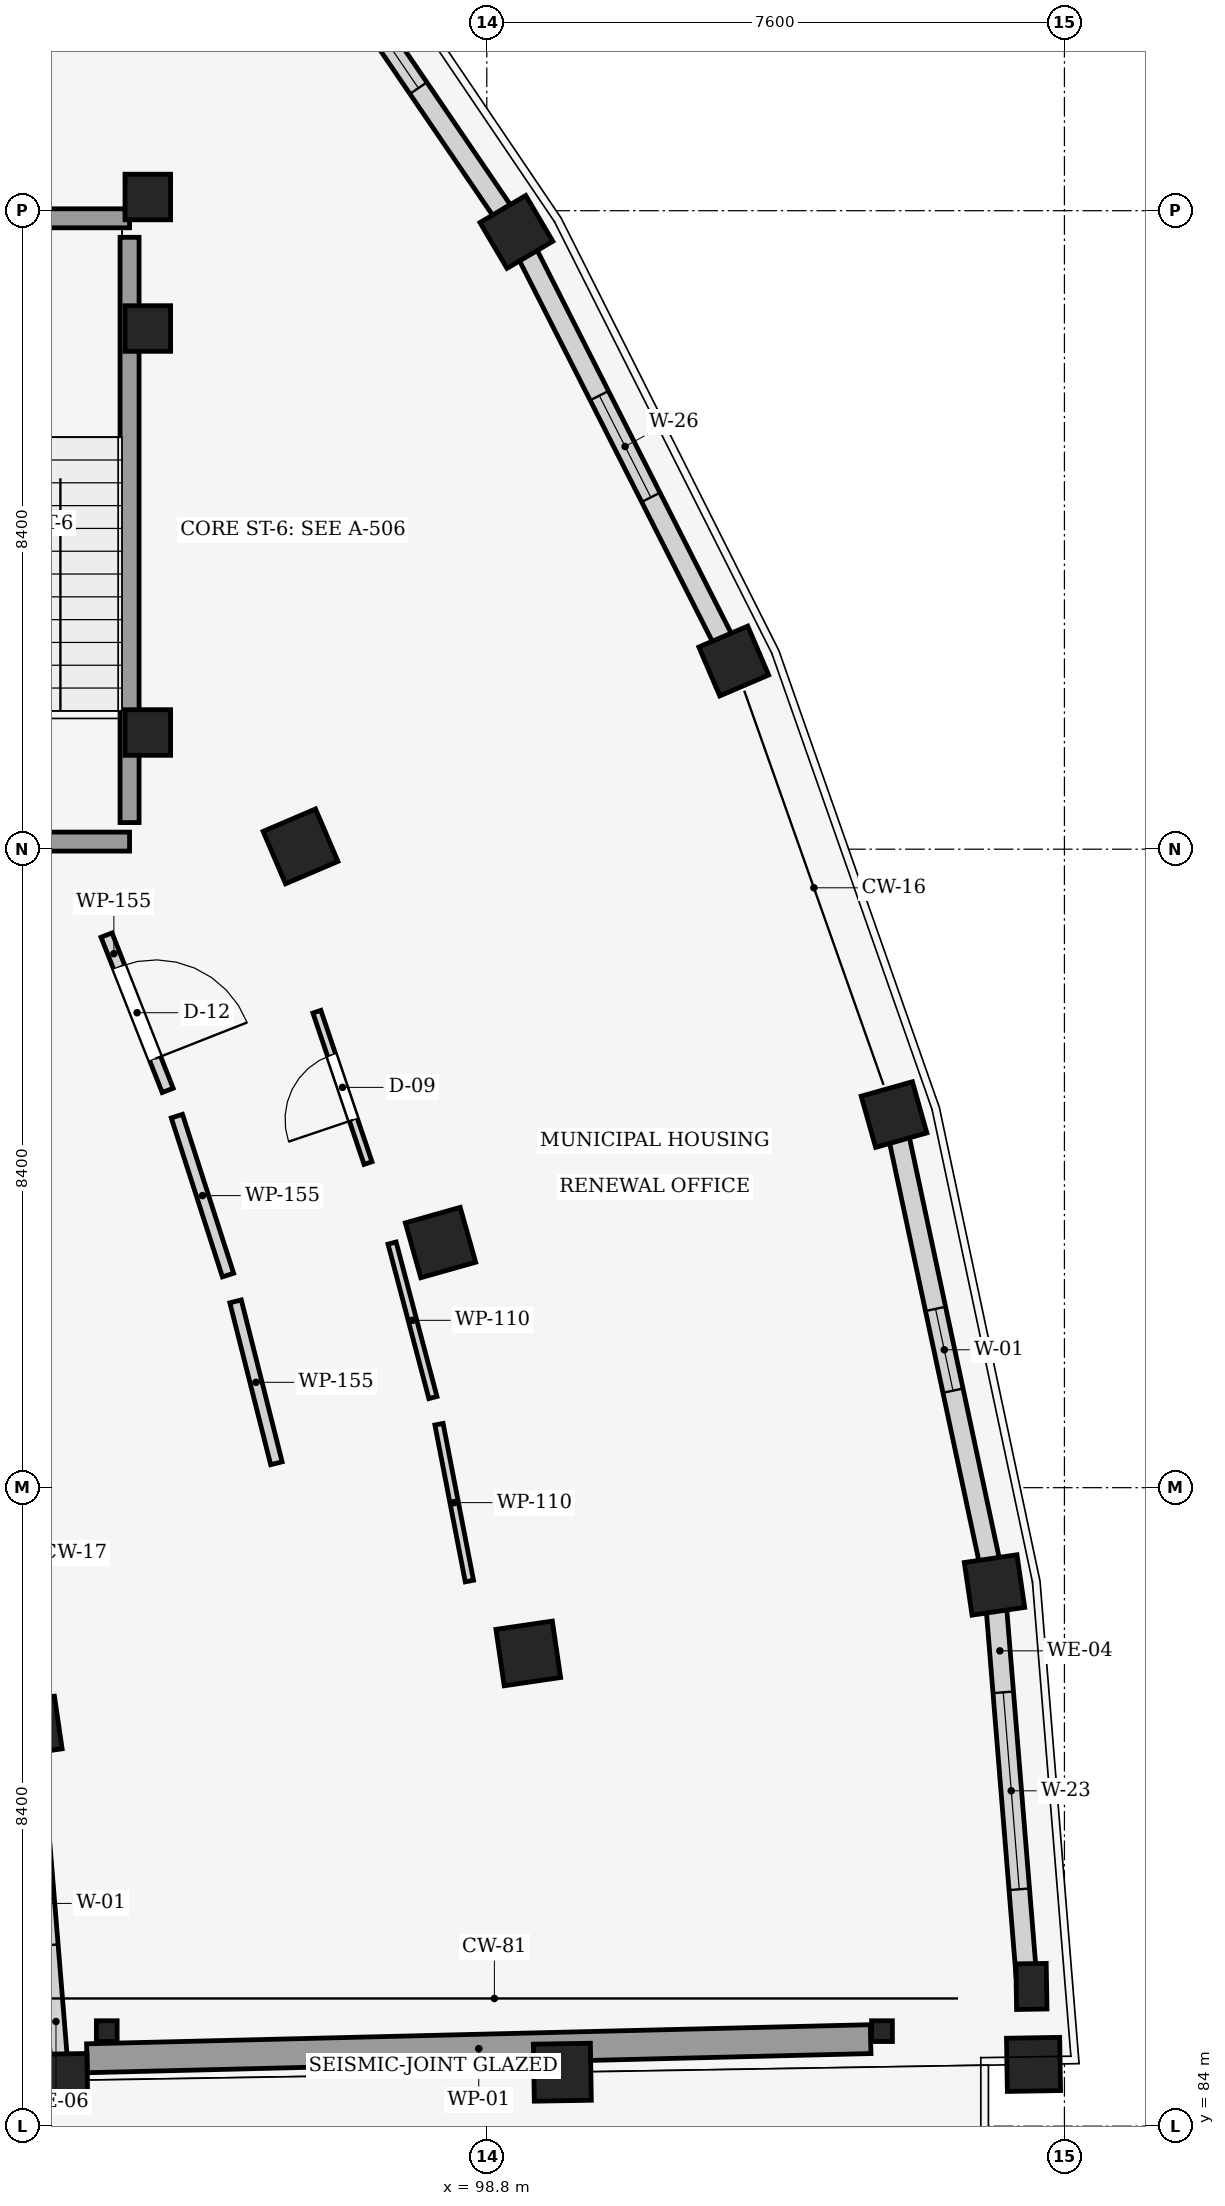
"""IFC4 building model, lengths in metres.
Left out: names, types, materials, properties, quantities, classifications, styles, units other than length and angle.
Written with IfcOpenShell. Run it as: python <this file> out.ifc"""

import sys

from ifc_helpers import new_model, si_unit, direction, frame, frame_2d, origin, origin_2d, place, context, subcontext, project, spatial, rectangle, circle, hollow_circle, extrude, element, fill, save


model = new_model("IFC4")
c1 = context("Model", 3, precision=1e-05, world=origin(), true_north=direction((0.0, 1.0)))
c2 = subcontext(c1, "Body", "Model", "MODEL_VIEW")
j1 = project(units=[si_unit("LENGTHUNIT", "METRE"), si_unit("PLANEANGLEUNIT", "RADIAN")], contexts=[c1])
p1 = place(None, origin())
s1 = spatial("IfcSite", under=j1, at=p1, CompositionType="ELEMENT")
p2 = place(p1, origin())
s2 = spatial("IfcBuilding", under=s1, at=p2, CompositionType="ELEMENT")
p3 = place(p2, frame((0.0, 0.0, 5.1)))
s3 = spatial("IfcBuildingStorey", under=s2, at=p3, CompositionType="ELEMENT", Elevation=5.1)
p4 = place(p3, frame((93.195, 84.6, 0.0), z_axis=(0.0, 0.0, 1.0), x_axis=(0.999862544538, 0.016579868188, 0.0)))
e1 = element("IfcColumn", 1, at=p4, inside=s3, PredefinedType="COLUMN", context=c2, shape_type="SweptSolid", body=[
    extrude(rectangle(XDim=0.7, YDim=0.7, at=origin_2d()), origin(), (0.0, 0.0, 1.0), 4.05),
])
p5 = place(p3, frame((99.794, 84.71, 0.0), z_axis=(0.0, 0.0, 1.0), x_axis=(0.999862544538, 0.016579868188, 0.0)))
e2 = element("IfcColumn", 2, at=p5, inside=s3, PredefinedType="COLUMN", context=c2, shape_type="SweptSolid", body=[
    extrude(circle(Radius=0.375, at=origin_2d()), origin(), (0.0, 0.0, 1.0), 4.05),
])
p6 = place(p3, frame((105.993, 84.812, 0.0), z_axis=(0.0, 0.0, 1.0), x_axis=(0.999862544538, 0.016579868188, 0.0)))
e3 = element("IfcColumn", 3, at=p6, inside=s3, PredefinedType="COLUMN", context=c2, shape_type="SweptSolid", body=[
    extrude(rectangle(XDim=0.7, YDim=0.7, at=origin_2d()), origin(), (0.0, 0.0, 1.0), 4.05),
])
p7 = place(p3, frame((105.966, 85.838, 0.0), z_axis=(0.0, 0.0, 1.0), x_axis=(0.999862544538, 0.016579868188, 0.0)))
e4 = element("IfcColumn", 4, at=p7, inside=s3, PredefinedType="PILASTER", context=c2, shape_type="SweptSolid", body=[
    extrude(rectangle(XDim=0.4, YDim=0.6, at=origin_2d()), origin(), (0.0, 0.0, 1.0), 4.05),
])
p8 = place(p3, frame((92.816, 89.26, 0.0), z_axis=(0.0, 0.0, 1.0), x_axis=(0.989399437751, 0.145219670077, 0.0)))
e5 = element("IfcColumn", 5, at=p8, inside=s3, PredefinedType="COLUMN", context=c2, shape_type="SweptSolid", body=[
    extrude(rectangle(XDim=0.7, YDim=0.7, at=origin_2d()), origin(), (0.0, 0.0, 1.0), 4.05),
])
p9 = place(p3, frame((99.346, 90.219, 0.0), z_axis=(0.0, 0.0, 1.0), x_axis=(0.989399437751, 0.145219670077, 0.0)))
e6 = element("IfcColumn", 6, at=p9, inside=s3, PredefinedType="COLUMN", context=c2, shape_type="SweptSolid", body=[
    extrude(circle(Radius=0.375, at=origin_2d()), origin(), (0.0, 0.0, 1.0), 4.05),
])
p10 = place(p3, frame((105.48, 91.12, 0.0), z_axis=(0.0, 0.0, 1.0), x_axis=(0.989399437751, 0.145219670077, 0.0)))
e7 = element("IfcColumn", 7, at=p10, inside=s3, PredefinedType="COLUMN", context=c2, shape_type="SweptSolid", body=[
    extrude(rectangle(XDim=0.7, YDim=0.7, at=origin_2d()), origin(), (0.0, 0.0, 1.0), 4.05),
])
p11 = place(p3, frame((98.191, 95.625, 0.0), z_axis=(0.0, 0.0, 1.0), x_axis=(0.962407846499, 0.271608425858, 0.0)))
e8 = element("IfcColumn", 8, at=p11, inside=s3, PredefinedType="COLUMN", context=c2, shape_type="SweptSolid", body=[
    extrude(circle(Radius=0.375, at=origin_2d()), origin(), (0.0, 0.0, 1.0), 4.05),
])
p12 = place(p3, frame((104.158, 97.309, 0.0), z_axis=(0.0, 0.0, 1.0), x_axis=(0.962407846499, 0.271608425858, 0.0)))
e9 = element("IfcColumn", 9, at=p12, inside=s3, PredefinedType="COLUMN", context=c2, shape_type="SweptSolid", body=[
    extrude(rectangle(XDim=0.7, YDim=0.7, at=origin_2d()), origin(), (0.0, 0.0, 1.0), 4.05),
])
p13 = place(p3, frame((96.349, 100.837, 0.0), z_axis=(0.0, 0.0, 1.0), x_axis=(0.919410138581, 0.393300136124, 0.0)))
e10 = element("IfcColumn", 10, at=p13, inside=s3, PredefinedType="COLUMN", context=c2, shape_type="SweptSolid", body=[
    extrude(circle(Radius=0.375, at=origin_2d()), origin(), (0.0, 0.0, 1.0), 4.05),
])
for number, where, z_axis, x_axis in (
    (11, (102.049, 103.276, 0.0), (0.0, 0.0, 1.0), (0.919, 0.393, 0.0)),
    (12, (99.189, 108.921, 0.0), (0.0, 0.0, 1.0), (0.861, 0.509, 0.0)),
):
    element("IfcColumn", number, at=place(p3, frame(where, z_axis=z_axis, x_axis=x_axis)), inside=s3, PredefinedType="COLUMN", context=c2, shape_type="SweptSolid", body=[
        extrude(rectangle(XDim=0.7, YDim=0.7, at=origin_2d()), origin(), (0.0, 0.0, 1.0), 4.05),
    ])
for number, where, z_axis, x_axis in (
    (13, (104.0, 85.25, 0.0), (0.0, 0.0, 1.0), (1.0, 0.0, 0.0)),
    (14, (93.8, 85.25, 0.0), (0.0, 0.0, 1.0), (1.0, 0.0, 0.0)),
):
    element("IfcColumn", number, at=place(p3, frame(where, z_axis=z_axis, x_axis=x_axis)), inside=s3, PredefinedType="COLUMN", context=c2, shape_type="SweptSolid", body=[
        extrude(hollow_circle(Radius=0.136, WallThickness=0.016, at=origin_2d()), origin(), (0.0, 0.0, 1.0), 3.82),
    ])
for number, where, z_axis, x_axis in (
    (15, (94.34, 102.335, 0.0), (0.0, 0.0, 1.0), (1.0, 0.0, 0.0)),
    (16, (94.34, 107.65, 0.0), (0.0, 0.0, 1.0), (1.0, 0.0, 0.0)),
    (17, (94.34, 109.38, 0.0), (0.0, 0.0, 1.0), (1.0, 0.0, 0.0)),
):
    element("IfcColumn", number, at=place(p3, frame(where, z_axis=z_axis, x_axis=x_axis)), inside=s3, PredefinedType="COLUMN", context=c2, shape_type="SweptSolid", body=[
        extrude(rectangle(XDim=0.6, YDim=0.6, at=origin_2d()), origin(), (0.0, 0.0, 1.0), 4.05),
    ])
p14 = place(p3, frame((105.503, 90.835, 0.0), z_axis=(0.0, 0.0, 1.0), x_axis=(0.081134010377, -0.996703201741, 0.0)))
e18 = element("IfcWall", 18, at=p14, inside=s3, PredefinedType="STANDARD", context=c2, shape_type="SweptSolid", body=[
    extrude(rectangle(XDim=4.863, YDim=0.27, at=frame_2d((2.431, 0.0))), origin(), (0.0, 0.0, 1.0), 2.995),
])
p15 = place(p14, frame((1.131, 0.0, 0.85)))
e19 = element("IfcOpeningElement", 19, at=p15, cuts=e18, PredefinedType="OPENING", context=c2, shape_type="SweptSolid", body=[
    extrude(rectangle(XDim=2.6, YDim=1.65, at=frame_2d((1.3, 0.825))), frame((0.0, 0.145, 0.0), z_axis=(0.0, -1.0, 0.0), x_axis=(1.0, 0.0, 0.0)), (0.0, 0.0, 1.0), 0.29),
])
p16 = place(p3, frame((93.172, 84.885, 0.0), z_axis=(0.0, 0.0, 1.0), x_axis=(-0.081095435938, 0.99670634104, 0.0)))
e20 = element("IfcWall", 20, at=p16, inside=s3, PredefinedType="STANDARD", context=c2, shape_type="SweptSolid", body=[
    extrude(rectangle(XDim=4.103, YDim=0.22, at=frame_2d((2.052, 0.0))), origin(), (0.0, 0.0, 1.0), 3.145),
])
p17 = place(p16, frame((1.502, 0.0, 0.85)))
e21 = element("IfcOpeningElement", 21, at=p17, cuts=e20, PredefinedType="OPENING", context=c2, shape_type="SweptSolid", body=[
    extrude(rectangle(XDim=1.1, YDim=1.35, at=frame_2d((0.55, 0.675))), frame((0.0, 0.12, 0.0), z_axis=(0.0, -1.0, 0.0), x_axis=(1.0, 0.0, 0.0)), (0.0, 0.0, 1.0), 0.24),
])
p18 = place(p3, frame((104.219, 97.024, 0.0), z_axis=(0.0, 0.0, 1.0), x_axis=(0.20889641488, -0.977937772995, 0.0)))
e22 = element("IfcWall", 22, at=p18, inside=s3, PredefinedType="STANDARD", context=c2, shape_type="SweptSolid", body=[
    extrude(rectangle(XDim=5.745, YDim=0.27, at=frame_2d((2.873, 0.0))), origin(), (0.0, 0.0, 1.0), 2.45),
])
p19 = place(p18, frame((2.323, 0.0, 0.85)))
e23 = element("IfcOpeningElement", 23, at=p19, cuts=e22, PredefinedType="OPENING", context=c2, shape_type="SweptSolid", body=[
    extrude(rectangle(XDim=1.1, YDim=1.35, at=frame_2d((0.55, 0.675))), frame((0.0, 0.145, 0.0), z_axis=(0.0, -1.0, 0.0), x_axis=(1.0, 0.0, 0.0)), (0.0, 0.0, 1.0), 0.29),
])
p20 = place(p3, frame((99.334, 108.636, 0.0), z_axis=(0.0, 0.0, 1.0), x_axis=(0.451927461329, -0.892054689857, 0.0)))
e24 = element("IfcWall", 24, at=p20, inside=s3, PredefinedType="STANDARD", context=c2, shape_type="SweptSolid", body=[
    extrude(rectangle(XDim=5.69, YDim=0.27, at=frame_2d((2.845, 0.0))), origin(), (0.0, 0.0, 1.0), 3.145),
])
p21 = place(p20, frame((2.095, 0.0, 0.85)))
e25 = element("IfcOpeningElement", 25, at=p21, cuts=e24, PredefinedType="OPENING", context=c2, shape_type="SweptSolid", body=[
    extrude(rectangle(XDim=1.5, YDim=1.85, at=frame_2d((0.75, 0.925))), frame((0.0, 0.145, 0.0), z_axis=(0.0, -1.0, 0.0), x_axis=(1.0, 0.0, 0.0)), (0.0, 0.0, 1.0), 0.29),
])
p22 = place(p3, frame((95.82, 113.865, 0.0), z_axis=(0.0, 0.0, 1.0), x_axis=(0.563124533307, -0.826372046955, 0.0)))
e26 = element("IfcWall", 26, at=p22, inside=s3, PredefinedType="STANDARD", context=c2, shape_type="SweptSolid", body=[
    extrude(rectangle(XDim=5.639, YDim=0.27, at=frame_2d((2.819, 0.0))), origin(), (0.0, 0.0, 1.0), 3.145),
])
p23 = place(p22, frame((1.944, 0.0, 0.85)))
e27 = element("IfcOpeningElement", 27, at=p23, cuts=e26, PredefinedType="OPENING", context=c2, shape_type="SweptSolid", body=[
    extrude(rectangle(XDim=1.75, YDim=1.85, at=frame_2d((0.875, 0.925))), frame((0.0, 0.145, 0.0), z_axis=(0.0, -1.0, 0.0), x_axis=(1.0, 0.0, 0.0)), (0.0, 0.0, 1.0), 0.29),
])
p24 = place(p3, frame((103.85, 85.145, 0.0), z_axis=(0.0, 0.0, 1.0), x_axis=(-0.999701591947, -0.024427997417, 0.0)))
e28 = element("IfcWall", 28, at=p24, inside=s3, PredefinedType="SHEAR", context=c2, shape_type="SweptSolid", body=[
    extrude(rectangle(XDim=10.314, YDim=0.38, at=frame_2d((5.157, 0.0))), origin(), (0.0, 0.0, 1.0), 3.75),
])
p25 = place(p3, frame((94.1, 100.9, 0.0), z_axis=(0.0, 0.0, 1.0), x_axis=(-1.0, 0.0, 0.0)))
e29 = element("IfcWall", 29, at=p25, inside=s3, PredefinedType="SHEAR", context=c2, shape_type="SweptSolid", body=[
    extrude(rectangle(XDim=3.64, YDim=0.25, at=frame_2d((1.82, 0.0))), origin(), (0.0, 0.0, 1.0), 4.05),
])
p26 = place(p25, frame((1.145, 0.0, 0.0)))
e30 = element("IfcOpeningElement", 30, at=p26, cuts=e29, PredefinedType="OPENING", context=c2, shape_type="SweptSolid", body=[
    extrude(rectangle(XDim=1.35, YDim=2.2, at=frame_2d((0.675, 1.1))), frame((0.0, 0.135, 0.0), z_axis=(0.0, -1.0, 0.0), x_axis=(1.0, 0.0, 0.0)), (0.0, 0.0, 1.0), 0.27),
])
p27 = place(p3, frame((90.46, 109.1, 0.0), z_axis=(0.0, 0.0, 1.0), x_axis=(1.0, 0.0, 0.0)))
e31 = element("IfcWall", 31, at=p27, inside=s3, PredefinedType="SHEAR", context=c2, shape_type="SweptSolid", body=[
    extrude(rectangle(XDim=3.64, YDim=0.25, at=frame_2d((1.82, 0.0))), origin(), (0.0, 0.0, 1.0), 4.05),
])
p28 = place(p3, frame((94.1, 108.85, 0.0), z_axis=(0.0, 0.0, 1.0), x_axis=(0.0, -1.0, 0.0)))
e32 = element("IfcWall", 32, at=p28, inside=s3, PredefinedType="SHEAR", context=c2, shape_type="SweptSolid", body=[
    extrude(rectangle(XDim=7.7, YDim=0.25, at=frame_2d((3.85, 0.0))), origin(), (0.0, 0.0, 1.0), 4.05),
])
p29 = place(p3, frame((98.091, 93.586, 0.0), z_axis=(0.0, 0.0, 1.0), x_axis=(-0.255630783162, 0.96677448389, 0.0)))
e33 = element("IfcWall", 33, at=p29, inside=s3, PredefinedType="PARTITIONING", context=c2, shape_type="SweptSolid", body=[
    extrude(rectangle(XDim=2.102, YDim=0.11, at=frame_2d((1.051, 0.0))), origin(), (0.0, 0.0, 1.0), 2.995),
])
p30 = place(p3, frame((97.237, 96.671, 0.0), z_axis=(0.0, 0.0, 1.0), x_axis=(-0.319884220621, 0.947456640379, 0.0)))
e34 = element("IfcWall", 34, at=p30, inside=s3, PredefinedType="PARTITIONING", context=c2, shape_type="SweptSolid", body=[
    extrude(rectangle(XDim=2.102, YDim=0.11, at=frame_2d((1.051, 0.0))), origin(), (0.0, 0.0, 1.0), 3.68),
])
p31 = place(p30, frame((0.601, 0.0, 0.0)))
e35 = element("IfcOpeningElement", 35, at=p31, cuts=e34, PredefinedType="OPENING", context=c2, shape_type="SweptSolid", body=[
    extrude(rectangle(XDim=0.9, YDim=2.22, at=frame_2d((0.45, 1.11))), frame((0.0, 0.065, 0.0), z_axis=(0.0, -1.0, 0.0), x_axis=(1.0, 0.0, 0.0)), (0.0, 0.0, 1.0), 0.13),
])
p32 = place(p3, frame((98.571, 91.171, 0.0), z_axis=(0.0, 0.0, 1.0), x_axis=(-0.19012663252, 0.981759575256, 0.0)))
e36 = element("IfcWall", 36, at=p32, inside=s3, PredefinedType="PARTITIONING", context=c2, shape_type="SweptSolid", body=[
    extrude(rectangle(XDim=2.102, YDim=0.11, at=frame_2d((1.051, 0.0))), origin(), (0.0, 0.0, 1.0), 3.68),
])
p33 = place(p3, frame((93.797, 99.67, 0.0), z_axis=(0.0, 0.0, 1.0), x_axis=(0.366364143448, -0.930471554856, 0.0)))
e37 = element("IfcWall", 37, at=p33, inside=s3, PredefinedType="PARTITIONING", context=c2, shape_type="SweptSolid", body=[
    extrude(rectangle(XDim=2.197, YDim=0.155, at=frame_2d((1.098, 0.0))), origin(), (0.0, 0.0, 1.0), 3.68),
])
p34 = place(p33, frame((0.448, 0.0, 0.0)))
e38 = element("IfcOpeningElement", 38, at=p34, cuts=e37, PredefinedType="OPENING", context=c2, shape_type="SweptSolid", body=[
    extrude(rectangle(XDim=1.3, YDim=2.22, at=frame_2d((0.65, 1.11))), frame((0.0, 0.087, 0.0), z_axis=(0.0, -1.0, 0.0), x_axis=(1.0, 0.0, 0.0)), (0.0, 0.0, 1.0), 0.175),
])
for number, where, z_axis, x_axis in (
    (39, (94.723, 97.288, 0.0), (0.0, 0.0, 1.0), (0.306, -0.952, 0.0)),
    (40, (95.495, 94.851, 0.0), (0.0, 0.0, 1.0), (0.245, -0.97, 0.0)),
):
    element("IfcWall", number, at=place(p3, frame(where, z_axis=z_axis, x_axis=x_axis)), inside=s3, PredefinedType="PARTITIONING", context=c2, shape_type="SweptSolid", body=[
        extrude(rectangle(XDim=2.197, YDim=0.155, at=frame_2d((1.098, 0.0))), origin(), (0.0, 0.0, 1.0), 2.995),
    ])
p35 = place(p15, origin())
e41 = element("IfcWindow", 41, at=p35, inside=s3, PartitioningType="SINGLE_PANEL", PredefinedType="WINDOW", context=c2, shape_type="SweptSolid", body=[
    extrude(rectangle(XDim=2.6, YDim=1.65, at=frame_2d((1.3, 0.825))), frame((0.0, 0.03, 0.0), z_axis=(0.0, -1.0, 0.0), x_axis=(1.0, 0.0, 0.0)), (0.0, 0.0, 1.0), 0.06),
])
fill(e19, e41)
p36 = place(p19, origin())
e42 = element("IfcWindow", 42, at=p36, inside=s3, PartitioningType="SINGLE_PANEL", PredefinedType="WINDOW", context=c2, shape_type="SweptSolid", body=[
    extrude(rectangle(XDim=1.1, YDim=1.35, at=frame_2d((0.55, 0.675))), frame((0.0, 0.03, 0.0), z_axis=(0.0, -1.0, 0.0), x_axis=(1.0, 0.0, 0.0)), (0.0, 0.0, 1.0), 0.06),
])
fill(e23, e42)
p37 = place(p21, origin())
e43 = element("IfcWindow", 43, at=p37, inside=s3, PartitioningType="SINGLE_PANEL", PredefinedType="WINDOW", context=c2, shape_type="SweptSolid", body=[
    extrude(rectangle(XDim=1.5, YDim=1.85, at=frame_2d((0.75, 0.925))), frame((0.0, 0.03, 0.0), z_axis=(0.0, -1.0, 0.0), x_axis=(1.0, 0.0, 0.0)), (0.0, 0.0, 1.0), 0.06),
])
fill(e25, e43)
p38 = place(p23, origin())
e44 = element("IfcWindow", 44, at=p38, inside=s3, PartitioningType="SINGLE_PANEL", PredefinedType="WINDOW", context=c2, shape_type="SweptSolid", body=[
    extrude(rectangle(XDim=1.75, YDim=1.85, at=frame_2d((0.875, 0.925))), frame((0.0, 0.03, 0.0), z_axis=(0.0, -1.0, 0.0), x_axis=(1.0, 0.0, 0.0)), (0.0, 0.0, 1.0), 0.06),
])
fill(e27, e44)
p39 = place(p31, origin())
e45 = element("IfcDoor", 45, at=p39, inside=s3, OperationType="SINGLE_SWING_LEFT", PredefinedType="DOOR", context=c2, shape_type="SweptSolid", body=[
    extrude(rectangle(XDim=0.9, YDim=2.22, at=frame_2d((0.45, 1.11))), frame((0.0, 0.025, 0.0), z_axis=(0.0, -1.0, 0.0), x_axis=(1.0, 0.0, 0.0)), (0.0, 0.0, 1.0), 0.05),
])
fill(e35, e45)
p40 = place(p34, origin())
e46 = element("IfcDoor", 46, at=p40, inside=s3, OperationType="SINGLE_SWING_RIGHT", PredefinedType="DOOR", context=c2, shape_type="SweptSolid", body=[
    extrude(rectangle(XDim=1.3, YDim=2.22, at=frame_2d((0.65, 1.11))), frame((0.0, 0.025, 0.0), z_axis=(0.0, -1.0, 0.0), x_axis=(1.0, 0.0, 0.0)), (0.0, 0.0, 1.0), 0.05),
])
fill(e38, e46)
save(model, sys.argv[1])
